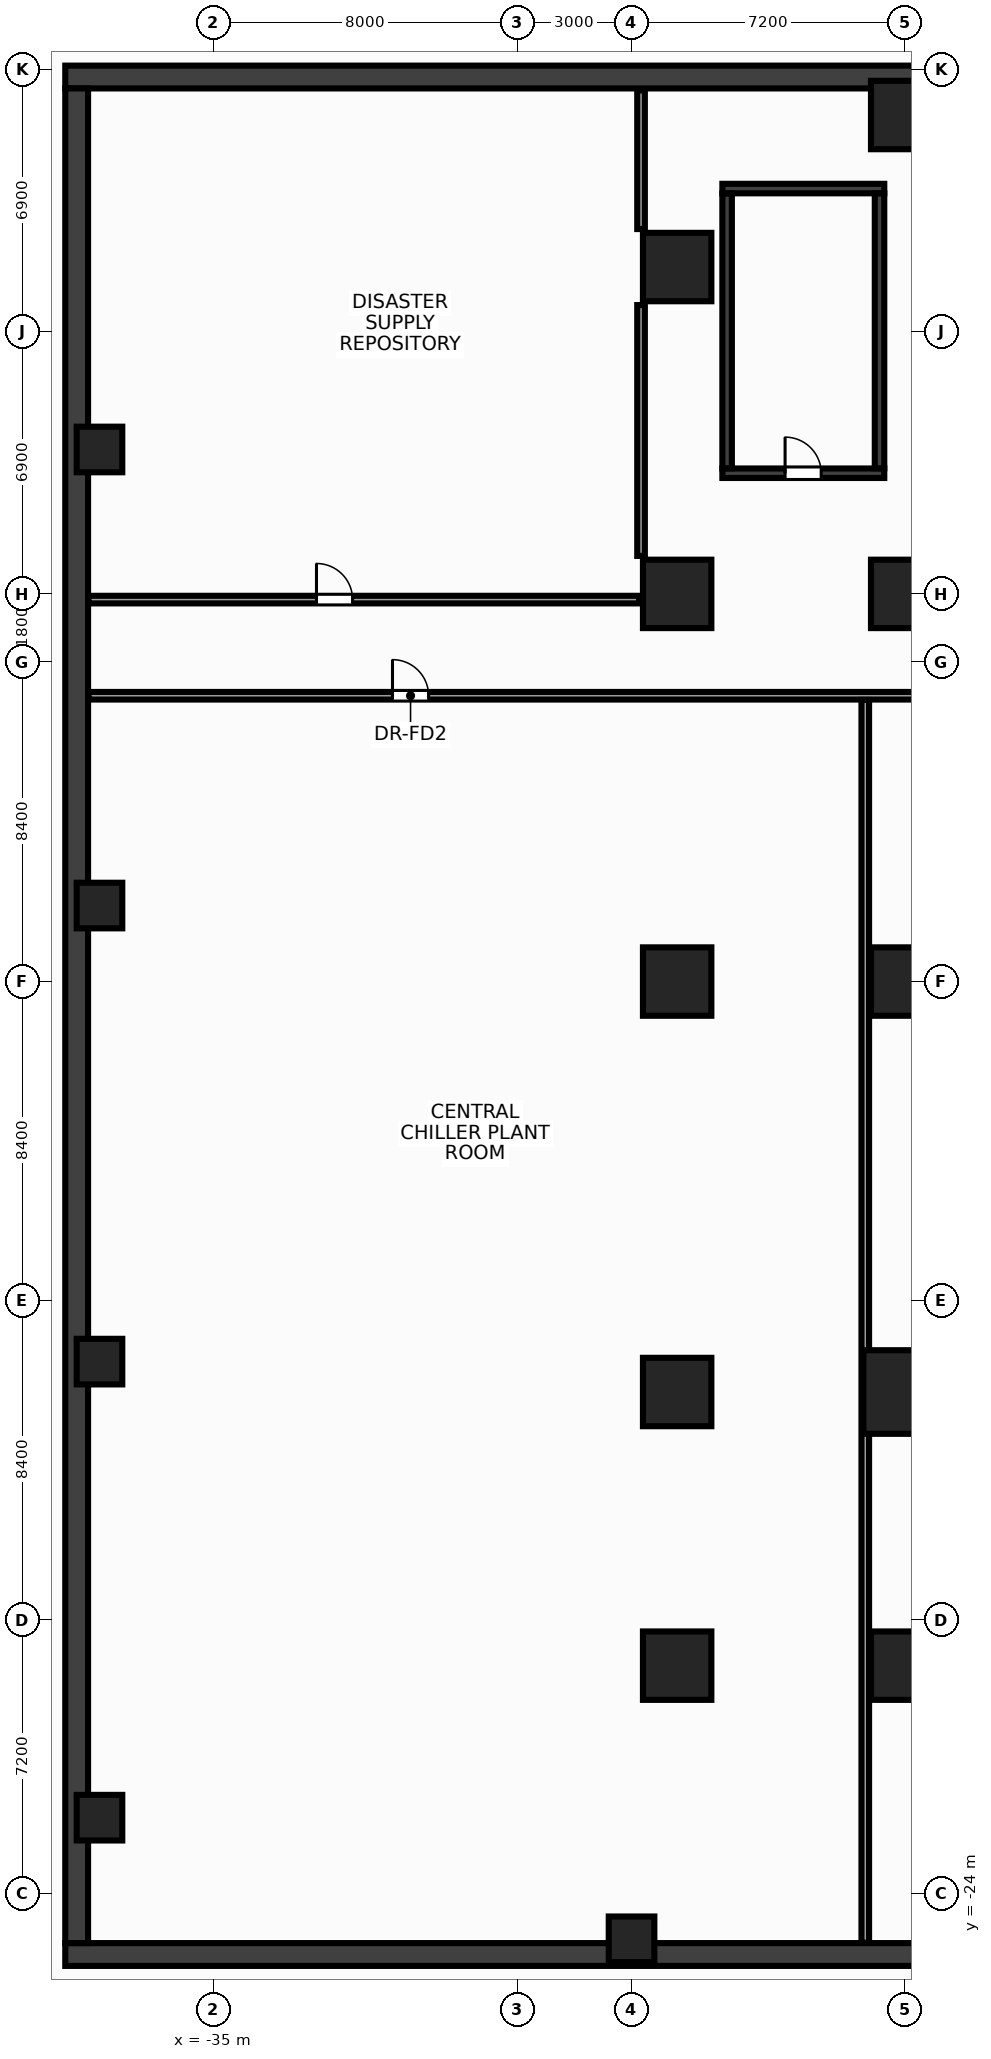
"""IFC4 building model, lengths in metres.
Left out: names, types, materials, properties, quantities, classifications, styles, units other than length and angle.
Written with IfcOpenShell. Run it as: python <this file> out.ifc"""

import sys

from ifc_helpers import new_model, si_unit, direction, frame, frame_2d, origin, origin_2d, place, context, subcontext, project, spatial, rectangle, hollow_rectangle, extrude, source, transform, mapped, element, fill, save


model = new_model("IFC4")
c1 = context("Model", 3, precision=1e-05, world=origin(), true_north=direction((0.0, 1.0)))
c2 = subcontext(c1, "Body", "Model", "MODEL_VIEW")
j1 = project(units=[si_unit("LENGTHUNIT", "METRE"), si_unit("PLANEANGLEUNIT", "RADIAN")], contexts=[c1])
p1 = place(None, origin())
s1 = spatial("IfcSite", under=j1, at=p1, CompositionType="ELEMENT")
p2 = place(p1, origin())
s2 = spatial("IfcBuilding", under=s1, at=p2, CompositionType="ELEMENT")
p3 = place(p2, frame((0.0, 0.0, -5.5)))
s3 = spatial("IfcBuildingStorey", under=s2, at=p3, CompositionType="ELEMENT", Elevation=-5.5)
m1 = source(origin(), c2, "Body", "SweptSolid", [
    extrude(rectangle(XDim=77.8, YDim=0.6, at=frame_2d((38.9, 0.0))), origin(), (0.0, 0.0, 1.0), 5.5),
])
p4 = place(p3, frame((-38.9, -25.6, 0.0), z_axis=(0.0, 0.0, 1.0), x_axis=(1.0, 0.0, 0.0)))
e1 = element("IfcWall", 1, at=p4, inside=s3, PredefinedType="SHEAR", context=c2, shape_type="MappedRepresentation", body=[
    mapped(m1, transform((0.0, 0.0, 0.0), x_axis=(1.0, 0.0, 0.0), y_axis=(0.0, 1.0, 0.0), z_axis=(0.0, 0.0, 1.0), scale=1.0)),
])
m2 = source(origin(), c2, "Body", "SweptSolid", [
    extrude(rectangle(XDim=22.9, YDim=0.6, at=frame_2d((11.45, 0.0))), origin(), (0.0, 0.0, 1.0), 5.5),
])
p5 = place(p3, frame((-38.9, 23.8, 0.0), z_axis=(0.0, 0.0, 1.0), x_axis=(1.0, 0.0, 0.0)))
e2 = element("IfcWall", 2, at=p5, inside=s3, PredefinedType="SHEAR", context=c2, shape_type="MappedRepresentation", body=[
    mapped(m2, transform((0.0, 0.0, 0.0), x_axis=(1.0, 0.0, 0.0), y_axis=(0.0, 1.0, 0.0), z_axis=(0.0, 0.0, 1.0), scale=1.0)),
])
m3 = source(origin(), c2, "Body", "SweptSolid", [
    extrude(rectangle(XDim=48.8, YDim=0.6, at=frame_2d((24.4, 0.0))), origin(), (0.0, 0.0, 1.0), 5.5),
])
p6 = place(p3, frame((-38.6, -25.3, 0.0), z_axis=(0.0, 0.0, 1.0), x_axis=(0.0, 1.0, 0.0)))
e3 = element("IfcWall", 3, at=p6, inside=s3, PredefinedType="SHEAR", context=c2, shape_type="MappedRepresentation", body=[
    mapped(m3, transform((0.0, 0.0, 0.0), x_axis=(1.0, 0.0, 0.0), y_axis=(0.0, 1.0, 0.0), z_axis=(0.0, 0.0, 1.0), scale=1.0)),
])
m4 = source(origin(), c2, "Body", "SweptSolid", [
    extrude(rectangle(XDim=4.26, YDim=0.25, at=frame_2d((2.13, 0.0))), origin(), (0.0, 0.0, 1.0), 5.5),
])
p7 = place(p3, frame((-21.61, 20.865, 0.0), z_axis=(0.0, 0.0, 1.0), x_axis=(1.0, 0.0, 0.0)))
e4 = element("IfcWall", 4, at=p7, inside=s3, PredefinedType="SHEAR", context=c2, shape_type="MappedRepresentation", body=[
    mapped(m4, transform((0.0, 0.0, 0.0), x_axis=(1.0, 0.0, 0.0), y_axis=(0.0, 1.0, 0.0), z_axis=(0.0, 0.0, 1.0), scale=1.0)),
])
p8 = place(p3, frame((-21.61, 13.375, 0.0), z_axis=(0.0, 0.0, 1.0), x_axis=(1.0, 0.0, 0.0)))
e5 = element("IfcWall", 5, at=p8, inside=s3, PredefinedType="SHEAR", context=c2, shape_type="MappedRepresentation", body=[
    mapped(m4, transform((0.0, 0.0, 0.0), x_axis=(1.0, 0.0, 0.0), y_axis=(0.0, 1.0, 0.0), z_axis=(0.0, 0.0, 1.0), scale=1.0)),
])
p9 = place(p8, frame((1.65, 0.0, 0.0)))
e6 = element("IfcOpeningElement", 6, at=p9, cuts=e5, PredefinedType="OPENING", context=c2, shape_type="SweptSolid", body=[
    extrude(rectangle(XDim=0.95, YDim=2.15, at=frame_2d((0.475, 1.075))), frame((0.0, 0.137, 0.0), z_axis=(0.0, -1.0, 0.0), x_axis=(1.0, 0.0, 0.0)), (0.0, 0.0, 1.0), 0.274),
])
m5 = source(origin(), c2, "Body", "SweptSolid", [
    extrude(rectangle(XDim=7.23, YDim=0.25, at=frame_2d((3.615, 0.0))), origin(), (0.0, 0.0, 1.0), 5.5),
])
for number, where, z_axis, x_axis in (
    (7, (-21.485, 13.505, 0.0), (0.0, 0.0, 1.0), (0.0, 1.0, 0.0)),
    (8, (-17.475, 13.505, 0.0), (0.0, 0.0, 1.0), (0.0, 1.0, 0.0)),
):
    element("IfcWall", number, at=place(p3, frame(where, z_axis=z_axis, x_axis=x_axis)), inside=s3, PredefinedType="SHEAR", context=c2, shape_type="MappedRepresentation", body=[
        mapped(m5, transform((0.0, 0.0, 0.0), x_axis=(1.0, 0.0, 0.0), y_axis=(0.0, 1.0, 0.0), z_axis=(0.0, 0.0, 1.0), scale=1.0)),
    ])
m6 = source(origin(), c2, "Body", "SweptSolid", [
    extrude(hollow_rectangle(XDim=1.2, YDim=1.2, WallThickness=0.055, at=origin_2d()), origin(), (0.0, 0.0, 1.0), 5.5),
])
for number, where, z_axis, x_axis in (
    (9, (-38.0, -22.0, 0.0), (0.0, 0.0, 1.0), (1.0, 0.0, 0.0)),
    (10, (-38.0, -10.0, 0.0), (0.0, 0.0, 1.0), (1.0, 0.0, 0.0)),
    (11, (-38.0, 2.0, 0.0), (0.0, 0.0, 1.0), (1.0, 0.0, 0.0)),
    (12, (-38.0, 14.0, 0.0), (0.0, 0.0, 1.0), (1.0, 0.0, 0.0)),
    (13, (-24.0, -25.2, 0.0), (0.0, 0.0, 1.0), (1.0, 0.0, 0.0)),
):
    element("IfcColumn", number, at=place(p3, frame(where, z_axis=z_axis, x_axis=x_axis)), inside=s3, PredefinedType="COLUMN", context=c2, shape_type="MappedRepresentation", body=[
        mapped(m6, transform((0.0, 0.0, 0.0), x_axis=(1.0, 0.0, 0.0), y_axis=(0.0, 1.0, 0.0), z_axis=(0.0, 0.0, 1.0), scale=1.0)),
    ])
m7 = source(origin(), c2, "Body", "SweptSolid", [
    extrude(rectangle(XDim=1.8, YDim=1.8, at=origin_2d()), origin(), (0.0, 0.0, 1.0), 5.5),
])
p10 = place(p3, frame((-16.8, -18.0, 0.0), z_axis=(0.0, 0.0, 1.0), x_axis=(1.0, 0.0, 0.0)))
e14 = element("IfcColumn", 14, at=p10, inside=s3, PredefinedType="COLUMN", context=c2, shape_type="MappedRepresentation", body=[
    mapped(m7, transform((0.0, 0.0, 0.0), x_axis=(1.0, 0.0, 0.0), y_axis=(0.0, 1.0, 0.0), z_axis=(0.0, 0.0, 1.0), scale=1.0)),
])
m8 = source(origin(), c2, "Body", "SweptSolid", [
    extrude(rectangle(XDim=2.2, YDim=2.2, at=origin_2d()), origin(), (0.0, 0.0, 1.0), 5.5),
])
p11 = place(p3, frame((-16.8, -10.8, 0.0), z_axis=(0.0, 0.0, 1.0), x_axis=(1.0, 0.0, 0.0)))
e15 = element("IfcColumn", 15, at=p11, inside=s3, PredefinedType="COLUMN", context=c2, shape_type="MappedRepresentation", body=[
    mapped(m8, transform((0.0, 0.0, 0.0), x_axis=(1.0, 0.0, 0.0), y_axis=(0.0, 1.0, 0.0), z_axis=(0.0, 0.0, 1.0), scale=1.0)),
])
for number, where, z_axis, x_axis in (
    (16, (-16.8, 0.0, 0.0), (0.0, 0.0, 1.0), (1.0, 0.0, 0.0)),
    (17, (-16.8, 10.2, 0.0), (0.0, 0.0, 1.0), (1.0, 0.0, 0.0)),
    (18, (-16.8, 22.8, 0.0), (0.0, 0.0, 1.0), (1.0, 0.0, 0.0)),
    (19, (-22.8, -18.0, 0.0), (0.0, 0.0, 1.0), (1.0, 0.0, 0.0)),
    (20, (-22.8, -10.8, 0.0), (0.0, 0.0, 1.0), (1.0, 0.0, 0.0)),
    (21, (-22.8, 0.0, 0.0), (0.0, 0.0, 1.0), (1.0, 0.0, 0.0)),
    (22, (-22.8, 10.2, 0.0), (0.0, 0.0, 1.0), (1.0, 0.0, 0.0)),
    (23, (-22.8, 18.8, 0.0), (0.0, 0.0, 1.0), (1.0, 0.0, 0.0)),
):
    element("IfcColumn", number, at=place(p3, frame(where, z_axis=z_axis, x_axis=x_axis)), inside=s3, PredefinedType="COLUMN", context=c2, shape_type="MappedRepresentation", body=[
        mapped(m7, transform((0.0, 0.0, 0.0), x_axis=(1.0, 0.0, 0.0), y_axis=(0.0, 1.0, 0.0), z_axis=(0.0, 0.0, 1.0), scale=1.0)),
    ])
m9 = source(origin(), c2, "Body", "SweptSolid", [
    extrude(rectangle(XDim=69.38, YDim=0.2, at=frame_2d((34.69, 0.0))), origin(), (0.0, 0.0, 1.0), 4.525),
])
p12 = place(p3, frame((-38.29, 7.52, 0.0), z_axis=(0.0, 0.0, 1.0), x_axis=(1.0, 0.0, 0.0)))
e24 = element("IfcWall", 24, at=p12, inside=s3, PredefinedType="PARTITIONING", context=c2, shape_type="MappedRepresentation", body=[
    mapped(m9, transform((0.0, 0.0, 0.0), x_axis=(1.0, 0.0, 0.0), y_axis=(0.0, 1.0, 0.0), z_axis=(0.0, 0.0, 1.0), scale=1.0)),
])
p13 = place(p12, frame((8.0, 0.0, 0.0)))
e25 = element("IfcOpeningElement", 25, at=p13, cuts=e24, PredefinedType="OPENING", context=c2, shape_type="SweptSolid", body=[
    extrude(rectangle(XDim=0.95, YDim=2.15, at=frame_2d((0.475, 1.075))), frame((0.0, 0.112, 0.0), z_axis=(0.0, -1.0, 0.0), x_axis=(1.0, 0.0, 0.0)), (0.0, 0.0, 1.0), 0.224),
])
p14 = place(p12, frame((26.0, 0.0, 0.0)))
e26 = element("IfcOpeningElement", 26, at=p14, cuts=e24, PredefinedType="OPENING", context=c2, shape_type="SweptSolid", body=[
    extrude(rectangle(XDim=0.95, YDim=2.15, at=frame_2d((0.475, 1.075))), frame((0.0, 0.112, 0.0), z_axis=(0.0, -1.0, 0.0), x_axis=(1.0, 0.0, 0.0)), (0.0, 0.0, 1.0), 0.224),
])
p15 = place(p12, frame((44.0, 0.0, 0.0)))
e27 = element("IfcOpeningElement", 27, at=p15, cuts=e24, PredefinedType="OPENING", context=c2, shape_type="SweptSolid", body=[
    extrude(rectangle(XDim=0.95, YDim=2.15, at=frame_2d((0.475, 1.075))), frame((0.0, 0.112, 0.0), z_axis=(0.0, -1.0, 0.0), x_axis=(1.0, 0.0, 0.0)), (0.0, 0.0, 1.0), 0.224),
])
p16 = place(p12, frame((58.0, 0.0, 0.0)))
e28 = element("IfcOpeningElement", 28, at=p16, cuts=e24, PredefinedType="OPENING", context=c2, shape_type="SweptSolid", body=[
    extrude(rectangle(XDim=0.95, YDim=2.15, at=frame_2d((0.475, 1.075))), frame((0.0, 0.112, 0.0), z_axis=(0.0, -1.0, 0.0), x_axis=(1.0, 0.0, 0.0)), (0.0, 0.0, 1.0), 0.224),
])
m10 = source(origin(), c2, "Body", "SweptSolid", [
    extrude(rectangle(XDim=14.49, YDim=0.2, at=frame_2d((7.245, 0.0))), origin(), (0.0, 0.0, 1.0), 4.525),
])
p17 = place(p3, frame((-38.29, 10.05, 0.0), z_axis=(0.0, 0.0, 1.0), x_axis=(1.0, 0.0, 0.0)))
e29 = element("IfcWall", 29, at=p17, inside=s3, PredefinedType="PARTITIONING", context=c2, shape_type="MappedRepresentation", body=[
    mapped(m10, transform((0.0, 0.0, 0.0), x_axis=(1.0, 0.0, 0.0), y_axis=(0.0, 1.0, 0.0), z_axis=(0.0, 0.0, 1.0), scale=1.0)),
])
p18 = place(p17, frame((6.0, 0.0, 0.0)))
e30 = element("IfcOpeningElement", 30, at=p18, cuts=e29, PredefinedType="OPENING", context=c2, shape_type="SweptSolid", body=[
    extrude(rectangle(XDim=0.95, YDim=2.15, at=frame_2d((0.475, 1.075))), frame((0.0, 0.112, 0.0), z_axis=(0.0, -1.0, 0.0), x_axis=(1.0, 0.0, 0.0)), (0.0, 0.0, 1.0), 0.224),
])
m11 = source(origin(), c2, "Body", "SweptSolid", [
    extrude(rectangle(XDim=6.6, YDim=0.2, at=frame_2d((3.3, 0.0))), origin(), (0.0, 0.0, 1.0), 5.14),
])
p19 = place(p3, frame((-23.75, 11.2, 0.0), z_axis=(0.0, 0.0, 1.0), x_axis=(0.0, 1.0, 0.0)))
e31 = element("IfcWall", 31, at=p19, inside=s3, PredefinedType="PARTITIONING", context=c2, shape_type="MappedRepresentation", body=[
    mapped(m11, transform((0.0, 0.0, 0.0), x_axis=(1.0, 0.0, 0.0), y_axis=(0.0, 1.0, 0.0), z_axis=(0.0, 0.0, 1.0), scale=1.0)),
])
m12 = source(origin(), c2, "Body", "SweptSolid", [
    extrude(rectangle(XDim=3.65, YDim=0.2, at=frame_2d((1.825, 0.0))), origin(), (0.0, 0.0, 1.0), 5.14),
])
p20 = place(p3, frame((-23.75, 19.8, 0.0), z_axis=(0.0, 0.0, 1.0), x_axis=(0.0, 1.0, 0.0)))
e32 = element("IfcWall", 32, at=p20, inside=s3, PredefinedType="PARTITIONING", context=c2, shape_type="MappedRepresentation", body=[
    mapped(m12, transform((0.0, 0.0, 0.0), x_axis=(1.0, 0.0, 0.0), y_axis=(0.0, 1.0, 0.0), z_axis=(0.0, 0.0, 1.0), scale=1.0)),
])
m13 = source(origin(), c2, "Body", "SweptSolid", [
    extrude(rectangle(XDim=32.7, YDim=0.2, at=frame_2d((16.35, 0.0))), origin(), (0.0, 0.0, 1.0), 4.525),
])
p21 = place(p3, frame((-17.85, -25.29, 0.0), z_axis=(0.0, 0.0, 1.0), x_axis=(0.0, 1.0, 0.0)))
e33 = element("IfcWall", 33, at=p21, inside=s3, PredefinedType="PARTITIONING", context=c2, shape_type="MappedRepresentation", body=[
    mapped(m13, transform((0.0, 0.0, 0.0), x_axis=(1.0, 0.0, 0.0), y_axis=(0.0, 1.0, 0.0), z_axis=(0.0, 0.0, 1.0), scale=1.0)),
])
m14 = source(origin(), c2, "Body", "SweptSolid", [
    extrude(rectangle(XDim=0.95, YDim=2.15, at=frame_2d((0.475, 1.075))), frame((0.0, 0.025, 0.0), z_axis=(0.0, -1.0, 0.0), x_axis=(1.0, 0.0, 0.0)), (0.0, 0.0, 1.0), 0.05),
])
p22 = place(p9, origin())
e34 = element("IfcDoor", 34, at=p22, inside=s3, OperationType="SINGLE_SWING_LEFT", PredefinedType="DOOR", context=c2, shape_type="MappedRepresentation", body=[
    mapped(m14, transform((0.0, 0.0, 0.0), x_axis=(1.0, 0.0, 0.0), y_axis=(0.0, 1.0, 0.0), z_axis=(0.0, 0.0, 1.0), scale=1.0)),
])
fill(e6, e34)
p23 = place(p13, origin())
e35 = element("IfcDoor", 35, at=p23, inside=s3, OperationType="SINGLE_SWING_LEFT", PredefinedType="DOOR", context=c2, shape_type="MappedRepresentation", body=[
    mapped(m14, transform((0.0, 0.0, 0.0), x_axis=(1.0, 0.0, 0.0), y_axis=(0.0, 1.0, 0.0), z_axis=(0.0, 0.0, 1.0), scale=1.0)),
])
fill(e25, e35)
p24 = place(p18, origin())
e36 = element("IfcDoor", 36, at=p24, inside=s3, OperationType="SINGLE_SWING_LEFT", PredefinedType="DOOR", context=c2, shape_type="MappedRepresentation", body=[
    mapped(m14, transform((0.0, 0.0, 0.0), x_axis=(1.0, 0.0, 0.0), y_axis=(0.0, 1.0, 0.0), z_axis=(0.0, 0.0, 1.0), scale=1.0)),
])
fill(e30, e36)
save(model, sys.argv[1])
